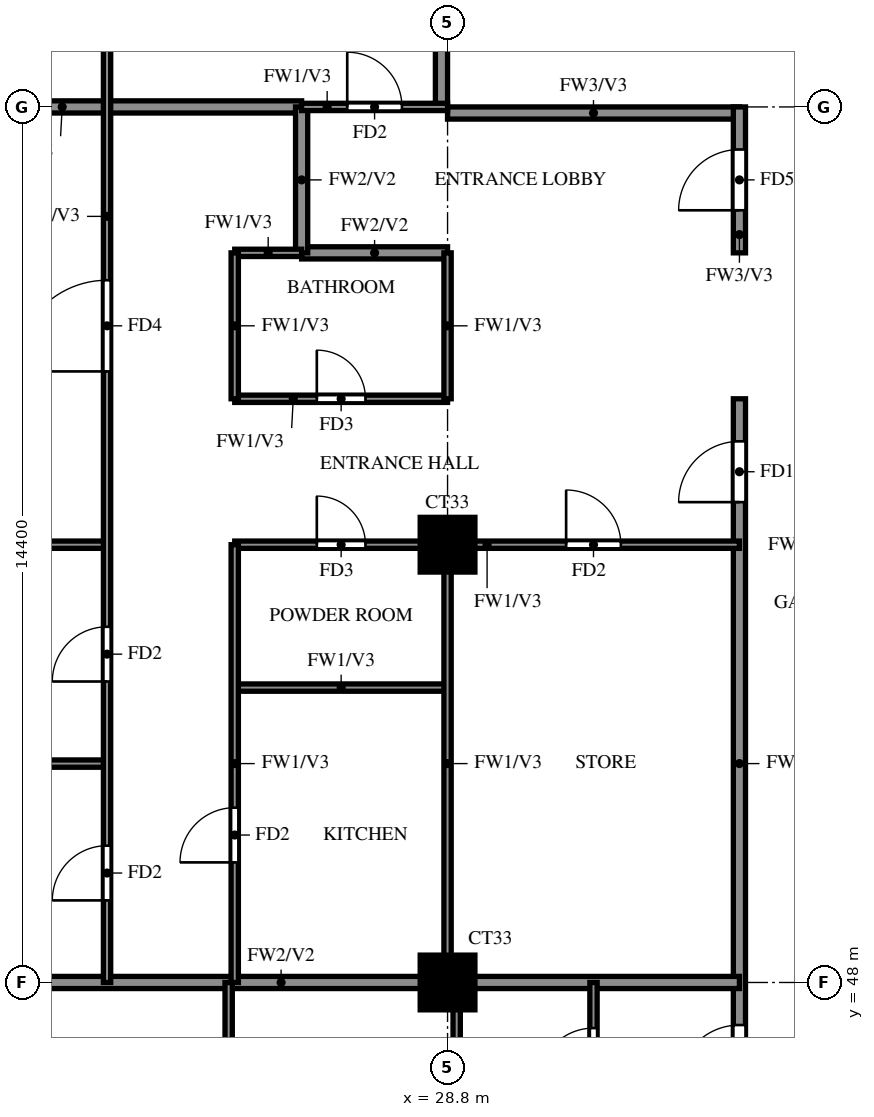
"""IFC4 building model, lengths in metres.
Left out: names, types, materials, properties, quantities, classifications, styles, units other than length and angle.
Written with IfcOpenShell. Run it as: python <this file> out.ifc"""

import sys

from ifc_helpers import new_model, si_unit, direction, frame, frame_2d, origin, origin_2d, place, context, subcontext, project, spatial, rectangle, extrude, source, transform, mapped, element, fill, save


model = new_model("IFC4")
c1 = context("Model", 3, precision=1e-05, world=origin(), true_north=direction((0.0, 1.0)))
c2 = subcontext(c1, "Body", "Model", "MODEL_VIEW")
j1 = project(units=[si_unit("LENGTHUNIT", "METRE"), si_unit("PLANEANGLEUNIT", "RADIAN")], contexts=[c1])
p1 = place(None, origin())
s1 = spatial("IfcSite", under=j1, at=p1, CompositionType="ELEMENT")
p2 = place(p1, origin())
s2 = spatial("IfcBuilding", under=s1, at=p2, CompositionType="ELEMENT")
p3 = place(p2, frame((0.0, 0.0, 222.0)))
s3 = spatial("IfcBuildingStorey", under=s2, at=p3, CompositionType="ELEMENT", Elevation=222.0)
m1 = source(origin(), c2, "Body", "SweptSolid", [
    extrude(rectangle(XDim=0.9, YDim=0.9, at=origin_2d()), origin(), (0.0, 0.0, 1.0), 3.22),
])
for number, where, z_axis, x_axis in (
    (1, (28.8, 48.0, 0.0), (0.0, 0.0, 1.0), (1.0, 0.0, 0.0)),
    (2, (28.8, 55.2, 0.0), (0.0, 0.0, 1.0), (1.0, 0.0, 0.0)),
):
    element("IfcColumn", number, at=place(p3, frame(where, z_axis=z_axis, x_axis=x_axis)), inside=s3, PredefinedType="COLUMN", context=c2, shape_type="MappedRepresentation", body=[
        mapped(m1, transform((0.0, 0.0, 0.0))),
    ])
p4 = place(p3, frame((28.8, 62.3, 0.0), z_axis=(0.0, 0.0, 1.0), x_axis=(1.0, 0.0, 0.0)))
e3 = element("IfcWall", 3, at=p4, inside=s3, PredefinedType="SOLIDWALL", context=c2, shape_type="SweptSolid", body=[
    extrude(rectangle(XDim=4.8, YDim=0.2, at=frame_2d((2.4, 0.0))), origin(), (0.0, 0.0, 1.0), 3.22),
])
p5 = place(p3, frame((28.7, 62.4, 0.0), z_axis=(0.0, 0.0, 1.0), x_axis=(0.0, 1.0, 0.0)))
e4 = element("IfcWall", 4, at=p5, inside=s3, PredefinedType="SOLIDWALL", context=c2, shape_type="SweptSolid", body=[
    extrude(rectangle(XDim=15.6, YDim=0.2, at=frame_2d((7.8, 0.0))), origin(), (0.0, 0.0, 1.0), 3.22),
])
p6 = place(p3, frame((33.6, 45.6, 0.0), z_axis=(0.0, 0.0, 1.0), x_axis=(0.0, 1.0, 0.0)))
e5 = element("IfcWall", 5, at=p6, inside=s3, PredefinedType="SOLIDWALL", context=c2, shape_type="SweptSolid", body=[
    extrude(rectangle(XDim=12.0, YDim=0.2, at=frame_2d((6.0, 0.0))), origin(), (0.0, 0.0, 1.0), 3.22),
])
p7 = place(p6, frame((0.7, 0.0, 0.0)))
e6 = element("IfcOpeningElement", 6, at=p7, cuts=e5, PredefinedType="OPENING", context=c2, shape_type="SweptSolid", body=[
    extrude(rectangle(XDim=1.0, YDim=2.1, at=frame_2d((0.5, 1.05))), frame((0.0, 0.11, 0.0), z_axis=(0.0, -1.0, 0.0), x_axis=(1.0, 0.0, 0.0)), (0.0, 0.0, 1.0), 0.22),
])
p8 = place(p6, frame((10.3, 0.0, 0.0)))
e7 = element("IfcOpeningElement", 7, at=p8, cuts=e5, PredefinedType="OPENING", context=c2, shape_type="SweptSolid", body=[
    extrude(rectangle(XDim=1.0, YDim=2.1, at=frame_2d((0.5, 1.05))), frame((0.0, 0.11, 0.0), z_axis=(0.0, -1.0, 0.0), x_axis=(1.0, 0.0, 0.0)), (0.0, 0.0, 1.0), 0.22),
])
p9 = place(p3, frame((33.6, 60.0, 0.0), z_axis=(0.0, 0.0, 1.0), x_axis=(0.0, 1.0, 0.0)))
e8 = element("IfcWall", 8, at=p9, inside=s3, PredefinedType="SOLIDWALL", context=c2, shape_type="SweptSolid", body=[
    extrude(rectangle(XDim=2.4, YDim=0.2, at=frame_2d((1.2, 0.0))), origin(), (0.0, 0.0, 1.0), 3.22),
])
p10 = place(p9, frame((0.7, 0.0, 0.0)))
e9 = element("IfcOpeningElement", 9, at=p10, cuts=e8, PredefinedType="OPENING", context=c2, shape_type="SweptSolid", body=[
    extrude(rectangle(XDim=1.0, YDim=2.1, at=frame_2d((0.5, 1.05))), frame((0.0, 0.11, 0.0), z_axis=(0.0, -1.0, 0.0), x_axis=(1.0, 0.0, 0.0)), (0.0, 0.0, 1.0), 0.22),
])
p11 = place(p3, frame((18.525, 48.0, 0.0), z_axis=(0.0, 0.0, 1.0), x_axis=(1.0, 0.0, 0.0)))
e10 = element("IfcWall", 10, at=p11, inside=s3, PredefinedType="SOLIDWALL", context=c2, shape_type="SweptSolid", body=[
    extrude(rectangle(XDim=15.075, YDim=0.2, at=frame_2d((7.538, 0.0))), origin(), (0.0, 0.0, 1.0), 3.22),
])
p12 = place(p3, frame((26.4, 60.0, 0.0), z_axis=(0.0, 0.0, 1.0), x_axis=(1.0, 0.0, 0.0)))
e11 = element("IfcWall", 11, at=p12, inside=s3, PredefinedType="SOLIDWALL", context=c2, shape_type="SweptSolid", body=[
    extrude(rectangle(XDim=2.4, YDim=0.2, at=frame_2d((1.2, 0.0))), origin(), (0.0, 0.0, 1.0), 3.22),
])
p13 = place(p3, frame((18.525, 62.4, 0.0), z_axis=(0.0, 0.0, 1.0), x_axis=(1.0, 0.0, 0.0)))
e12 = element("IfcWall", 12, at=p13, inside=s3, PredefinedType="SOLIDWALL", context=c2, shape_type="SweptSolid", body=[
    extrude(rectangle(XDim=7.875, YDim=0.2, at=frame_2d((3.938, 0.0))), origin(), (0.0, 0.0, 1.0), 3.22),
])
p14 = place(p3, frame((26.4, 60.0, 0.0), z_axis=(0.0, 0.0, 1.0), x_axis=(0.0, 1.0, 0.0)))
e13 = element("IfcWall", 13, at=p14, inside=s3, PredefinedType="SOLIDWALL", context=c2, shape_type="SweptSolid", body=[
    extrude(rectangle(XDim=2.4, YDim=0.2, at=frame_2d((1.2, 0.0))), origin(), (0.0, 0.0, 1.0), 3.22),
])
p15 = place(p3, frame((18.525, 51.6, 0.0), z_axis=(0.0, 0.0, 1.0), x_axis=(1.0, 0.0, 0.0)))
e14 = element("IfcWall", 14, at=p15, inside=s3, PredefinedType="PARTITIONING", context=c2, shape_type="SweptSolid", body=[
    extrude(rectangle(XDim=4.675, YDim=0.12, at=frame_2d((2.337, 0.0))), origin(), (0.0, 0.0, 1.0), 2.32),
])
p16 = place(p3, frame((25.3, 52.85, 0.0), z_axis=(0.0, 0.0, 1.0), x_axis=(1.0, 0.0, 0.0)))
e15 = element("IfcWall", 15, at=p16, inside=s3, PredefinedType="PARTITIONING", context=c2, shape_type="SweptSolid", body=[
    extrude(rectangle(XDim=3.5, YDim=0.12, at=frame_2d((1.75, 0.0))), origin(), (0.0, 0.0, 1.0), 3.22),
])
p17 = place(p3, frame((18.525, 55.2, 0.0), z_axis=(0.0, 0.0, 1.0), x_axis=(1.0, 0.0, 0.0)))
e16 = element("IfcWall", 16, at=p17, inside=s3, PredefinedType="PARTITIONING", context=c2, shape_type="SweptSolid", body=[
    extrude(rectangle(XDim=4.675, YDim=0.12, at=frame_2d((2.337, 0.0))), origin(), (0.0, 0.0, 1.0), 3.22),
])
p18 = place(p3, frame((25.3, 55.2, 0.0), z_axis=(0.0, 0.0, 1.0), x_axis=(1.0, 0.0, 0.0)))
e17 = element("IfcWall", 17, at=p18, inside=s3, PredefinedType="PARTITIONING", context=c2, shape_type="SweptSolid", body=[
    extrude(rectangle(XDim=8.3, YDim=0.12, at=frame_2d((4.15, 0.0))), origin(), (0.0, 0.0, 1.0), 3.22),
])
p19 = place(p18, frame((1.35, 0.0, 0.0)))
e18 = element("IfcOpeningElement", 18, at=p19, cuts=e17, PredefinedType="OPENING", context=c2, shape_type="SweptSolid", body=[
    extrude(rectangle(XDim=0.8, YDim=2.1, at=frame_2d((0.4, 1.05))), frame((0.0, 0.07, 0.0), z_axis=(0.0, -1.0, 0.0), x_axis=(1.0, 0.0, 0.0)), (0.0, 0.0, 1.0), 0.14),
])
p20 = place(p18, frame((5.45, 0.0, 0.0)))
e19 = element("IfcOpeningElement", 19, at=p20, cuts=e17, PredefinedType="OPENING", context=c2, shape_type="SweptSolid", body=[
    extrude(rectangle(XDim=0.9, YDim=2.1, at=frame_2d((0.45, 1.05))), frame((0.0, 0.07, 0.0), z_axis=(0.0, -1.0, 0.0), x_axis=(1.0, 0.0, 0.0)), (0.0, 0.0, 1.0), 0.14),
])
p21 = place(p3, frame((25.3, 57.6, 0.0), z_axis=(0.0, 0.0, 1.0), x_axis=(1.0, 0.0, 0.0)))
e20 = element("IfcWall", 20, at=p21, inside=s3, PredefinedType="PARTITIONING", context=c2, shape_type="SweptSolid", body=[
    extrude(rectangle(XDim=3.5, YDim=0.12, at=frame_2d((1.75, 0.0))), origin(), (0.0, 0.0, 1.0), 3.22),
])
p22 = place(p21, frame((1.35, 0.0, 0.0)))
e21 = element("IfcOpeningElement", 21, at=p22, cuts=e20, PredefinedType="OPENING", context=c2, shape_type="SweptSolid", body=[
    extrude(rectangle(XDim=0.8, YDim=2.1, at=frame_2d((0.4, 1.05))), frame((0.0, 0.07, 0.0), z_axis=(0.0, -1.0, 0.0), x_axis=(1.0, 0.0, 0.0)), (0.0, 0.0, 1.0), 0.14),
])
p23 = place(p3, frame((25.3, 60.0, 0.0), z_axis=(0.0, 0.0, 1.0), x_axis=(1.0, 0.0, 0.0)))
e22 = element("IfcWall", 22, at=p23, inside=s3, PredefinedType="PARTITIONING", context=c2, shape_type="SweptSolid", body=[
    extrude(rectangle(XDim=1.1, YDim=0.12, at=frame_2d((0.55, 0.0))), origin(), (0.0, 0.0, 1.0), 3.22),
])
p24 = place(p3, frame((26.4, 62.4, 0.0), z_axis=(0.0, 0.0, 1.0), x_axis=(1.0, 0.0, 0.0)))
e23 = element("IfcWall", 23, at=p24, inside=s3, PredefinedType="PARTITIONING", context=c2, shape_type="SweptSolid", body=[
    extrude(rectangle(XDim=2.4, YDim=0.12, at=frame_2d((1.2, 0.0))), origin(), (0.0, 0.0, 1.0), 3.22),
])
p25 = place(p24, frame((0.75, 0.0, 0.0)))
e24 = element("IfcOpeningElement", 24, at=p25, cuts=e23, PredefinedType="OPENING", context=c2, shape_type="SweptSolid", body=[
    extrude(rectangle(XDim=0.9, YDim=2.1, at=frame_2d((0.45, 1.05))), frame((0.0, 0.07, 0.0), z_axis=(0.0, -1.0, 0.0), x_axis=(1.0, 0.0, 0.0)), (0.0, 0.0, 1.0), 0.14),
])
p26 = place(p3, frame((23.2, 48.0, 0.0), z_axis=(0.0, 0.0, 1.0), x_axis=(0.0, 1.0, 0.0)))
e25 = element("IfcWall", 25, at=p26, inside=s3, PredefinedType="PARTITIONING", context=c2, shape_type="SweptSolid", body=[
    extrude(rectangle(XDim=25.2, YDim=0.12, at=frame_2d((12.6, 0.0))), origin(), (0.0, 0.0, 1.0), 3.22),
])
p27 = place(p26, frame((1.35, 0.0, 0.0)))
e26 = element("IfcOpeningElement", 26, at=p27, cuts=e25, PredefinedType="OPENING", context=c2, shape_type="SweptSolid", body=[
    extrude(rectangle(XDim=0.9, YDim=2.1, at=frame_2d((0.45, 1.05))), frame((0.0, 0.07, 0.0), z_axis=(0.0, -1.0, 0.0), x_axis=(1.0, 0.0, 0.0)), (0.0, 0.0, 1.0), 0.14),
])
p28 = place(p26, frame((4.95, 0.0, 0.0)))
e27 = element("IfcOpeningElement", 27, at=p28, cuts=e25, PredefinedType="OPENING", context=c2, shape_type="SweptSolid", body=[
    extrude(rectangle(XDim=0.9, YDim=2.1, at=frame_2d((0.45, 1.05))), frame((0.0, 0.07, 0.0), z_axis=(0.0, -1.0, 0.0), x_axis=(1.0, 0.0, 0.0)), (0.0, 0.0, 1.0), 0.14),
])
p29 = place(p26, frame((10.05, 0.0, 0.0)))
e28 = element("IfcOpeningElement", 28, at=p29, cuts=e25, PredefinedType="OPENING", context=c2, shape_type="SweptSolid", body=[
    extrude(rectangle(XDim=1.5, YDim=2.1, at=frame_2d((0.75, 1.05))), frame((0.0, 0.07, 0.0), z_axis=(0.0, -1.0, 0.0), x_axis=(1.0, 0.0, 0.0)), (0.0, 0.0, 1.0), 0.14),
])
p30 = place(p26, frame((15.75, 0.0, 0.0)))
e29 = element("IfcOpeningElement", 29, at=p30, cuts=e25, PredefinedType="OPENING", context=c2, shape_type="SweptSolid", body=[
    extrude(rectangle(XDim=0.9, YDim=2.1, at=frame_2d((0.45, 1.05))), frame((0.0, 0.07, 0.0), z_axis=(0.0, -1.0, 0.0), x_axis=(1.0, 0.0, 0.0)), (0.0, 0.0, 1.0), 0.14),
])
p31 = place(p26, frame((19.35, 0.0, 0.0)))
e30 = element("IfcOpeningElement", 30, at=p31, cuts=e25, PredefinedType="OPENING", context=c2, shape_type="SweptSolid", body=[
    extrude(rectangle(XDim=0.9, YDim=2.1, at=frame_2d((0.45, 1.05))), frame((0.0, 0.07, 0.0), z_axis=(0.0, -1.0, 0.0), x_axis=(1.0, 0.0, 0.0)), (0.0, 0.0, 1.0), 0.14),
])
p32 = place(p26, frame((22.95, 0.0, 0.0)))
e31 = element("IfcOpeningElement", 31, at=p32, cuts=e25, PredefinedType="OPENING", context=c2, shape_type="SweptSolid", body=[
    extrude(rectangle(XDim=0.9, YDim=2.1, at=frame_2d((0.45, 1.05))), frame((0.0, 0.07, 0.0), z_axis=(0.0, -1.0, 0.0), x_axis=(1.0, 0.0, 0.0)), (0.0, 0.0, 1.0), 0.14),
])
p33 = place(p3, frame((25.2, 39.725, 0.0), z_axis=(0.0, 0.0, 1.0), x_axis=(0.0, 1.0, 0.0)))
e32 = element("IfcWall", 32, at=p33, inside=s3, PredefinedType="PARTITIONING", context=c2, shape_type="SweptSolid", body=[
    extrude(rectangle(XDim=8.275, YDim=0.12, at=frame_2d((4.137, 0.0))), origin(), (0.0, 0.0, 1.0), 3.22),
])
p34 = place(p33, frame((4.525, 0.0, 0.0)))
e33 = element("IfcOpeningElement", 33, at=p34, cuts=e32, PredefinedType="OPENING", context=c2, shape_type="SweptSolid", body=[
    extrude(rectangle(XDim=0.9, YDim=2.1, at=frame_2d((0.45, 1.05))), frame((0.0, 0.07, 0.0), z_axis=(0.0, -1.0, 0.0), x_axis=(1.0, 0.0, 0.0)), (0.0, 0.0, 1.0), 0.14),
])
p35 = place(p3, frame((25.3, 48.0, 0.0), z_axis=(0.0, 0.0, 1.0), x_axis=(0.0, 1.0, 0.0)))
e34 = element("IfcWall", 34, at=p35, inside=s3, PredefinedType="PARTITIONING", context=c2, shape_type="SweptSolid", body=[
    extrude(rectangle(XDim=7.2, YDim=0.12, at=frame_2d((3.6, 0.0))), origin(), (0.0, 0.0, 1.0), 3.22),
])
p36 = place(p35, frame((1.975, 0.0, 0.0)))
e35 = element("IfcOpeningElement", 35, at=p36, cuts=e34, PredefinedType="OPENING", context=c2, shape_type="SweptSolid", body=[
    extrude(rectangle(XDim=0.9, YDim=2.1, at=frame_2d((0.45, 1.05))), frame((0.0, 0.07, 0.0), z_axis=(0.0, -1.0, 0.0), x_axis=(1.0, 0.0, 0.0)), (0.0, 0.0, 1.0), 0.14),
])
p37 = place(p3, frame((25.3, 57.6, 0.0), z_axis=(0.0, 0.0, 1.0), x_axis=(0.0, 1.0, 0.0)))
e36 = element("IfcWall", 36, at=p37, inside=s3, PredefinedType="PARTITIONING", context=c2, shape_type="SweptSolid", body=[
    extrude(rectangle(XDim=2.4, YDim=0.12, at=frame_2d((1.2, 0.0))), origin(), (0.0, 0.0, 1.0), 3.22),
])
p38 = place(p3, frame((28.8, 48.0, 0.0), z_axis=(0.0, 0.0, 1.0), x_axis=(0.0, 1.0, 0.0)))
e37 = element("IfcWall", 37, at=p38, inside=s3, PredefinedType="PARTITIONING", context=c2, shape_type="SweptSolid", body=[
    extrude(rectangle(XDim=7.2, YDim=0.12, at=frame_2d((3.6, 0.0))), origin(), (0.0, 0.0, 1.0), 3.22),
])
for number, where, z_axis, x_axis in (
    (38, (28.8, 57.6, 0.0), (0.0, 0.0, 1.0), (0.0, 1.0, 0.0)),
    (39, (28.95, 45.6, 0.0), (0.0, 0.0, 1.0), (0.0, 1.0, 0.0)),
):
    element("IfcWall", number, at=place(p3, frame(where, z_axis=z_axis, x_axis=x_axis)), inside=s3, PredefinedType="PARTITIONING", context=c2, shape_type="SweptSolid", body=[
        extrude(rectangle(XDim=2.4, YDim=0.12, at=frame_2d((1.2, 0.0))), origin(), (0.0, 0.0, 1.0), 3.22),
    ])
p39 = place(p3, frame((31.2, 45.6, 0.0), z_axis=(0.0, 0.0, 1.0), x_axis=(0.0, 1.0, 0.0)))
e40 = element("IfcWall", 40, at=p39, inside=s3, PredefinedType="PARTITIONING", context=c2, shape_type="SweptSolid", body=[
    extrude(rectangle(XDim=2.4, YDim=0.12, at=frame_2d((1.2, 0.0))), origin(), (0.0, 0.0, 1.0), 3.22),
])
p40 = place(p39, frame((0.75, 0.0, 0.0)))
e41 = element("IfcOpeningElement", 41, at=p40, cuts=e40, PredefinedType="OPENING", context=c2, shape_type="SweptSolid", body=[
    extrude(rectangle(XDim=0.9, YDim=2.1, at=frame_2d((0.45, 1.05))), frame((0.0, 0.07, 0.0), z_axis=(0.0, -1.0, 0.0), x_axis=(1.0, 0.0, 0.0)), (0.0, 0.0, 1.0), 0.14),
])
p41 = place(p7, origin())
e42 = element("IfcDoor", 42, at=p41, inside=s3, OperationType="SINGLE_SWING_LEFT", PredefinedType="DOOR", context=c2, shape_type="SweptSolid", body=[
    extrude(rectangle(XDim=1.0, YDim=2.1, at=frame_2d((0.5, 1.05))), frame((0.0, 0.025, 0.0), z_axis=(0.0, -1.0, 0.0), x_axis=(1.0, 0.0, 0.0)), (0.0, 0.0, 1.0), 0.05),
])
fill(e6, e42)
p42 = place(p40, origin())
e43 = element("IfcDoor", 43, at=p42, inside=s3, OperationType="SINGLE_SWING_LEFT", PredefinedType="DOOR", context=c2, shape_type="SweptSolid", body=[
    extrude(rectangle(XDim=0.9, YDim=2.1, at=frame_2d((0.45, 1.05))), frame((0.0, 0.025, 0.0), z_axis=(0.0, -1.0, 0.0), x_axis=(1.0, 0.0, 0.0)), (0.0, 0.0, 1.0), 0.05),
])
fill(e41, e43)
p43 = place(p8, origin())
e44 = element("IfcDoor", 44, at=p43, inside=s3, OperationType="SINGLE_SWING_RIGHT", PredefinedType="DOOR", context=c2, shape_type="SweptSolid", body=[
    extrude(rectangle(XDim=1.0, YDim=2.1, at=frame_2d((0.5, 1.05))), frame((0.0, 0.025, 0.0), z_axis=(0.0, -1.0, 0.0), x_axis=(1.0, 0.0, 0.0)), (0.0, 0.0, 1.0), 0.05),
])
fill(e7, e44)
p44 = place(p27, origin())
e45 = element("IfcDoor", 45, at=p44, inside=s3, OperationType="SINGLE_SWING_LEFT", PredefinedType="DOOR", context=c2, shape_type="SweptSolid", body=[
    extrude(rectangle(XDim=0.9, YDim=2.1, at=frame_2d((0.45, 1.05))), frame((0.0, 0.025, 0.0), z_axis=(0.0, -1.0, 0.0), x_axis=(1.0, 0.0, 0.0)), (0.0, 0.0, 1.0), 0.05),
])
fill(e26, e45)
p45 = place(p28, origin())
e46 = element("IfcDoor", 46, at=p45, inside=s3, OperationType="SINGLE_SWING_LEFT", PredefinedType="DOOR", context=c2, shape_type="SweptSolid", body=[
    extrude(rectangle(XDim=0.9, YDim=2.1, at=frame_2d((0.45, 1.05))), frame((0.0, 0.025, 0.0), z_axis=(0.0, -1.0, 0.0), x_axis=(1.0, 0.0, 0.0)), (0.0, 0.0, 1.0), 0.05),
])
fill(e27, e46)
p46 = place(p29, origin())
e47 = element("IfcDoor", 47, at=p46, inside=s3, OperationType="SINGLE_SWING_RIGHT", PredefinedType="DOOR", context=c2, shape_type="SweptSolid", body=[
    extrude(rectangle(XDim=1.5, YDim=2.1, at=frame_2d((0.75, 1.05))), frame((0.0, 0.025, 0.0), z_axis=(0.0, -1.0, 0.0), x_axis=(1.0, 0.0, 0.0)), (0.0, 0.0, 1.0), 0.05),
])
fill(e28, e47)
p47 = place(p36, origin())
e48 = element("IfcDoor", 48, at=p47, inside=s3, OperationType="SINGLE_SWING_LEFT", PredefinedType="DOOR", context=c2, shape_type="SweptSolid", body=[
    extrude(rectangle(XDim=0.9, YDim=2.1, at=frame_2d((0.45, 1.05))), frame((0.0, 0.025, 0.0), z_axis=(0.0, -1.0, 0.0), x_axis=(1.0, 0.0, 0.0)), (0.0, 0.0, 1.0), 0.05),
])
fill(e35, e48)
p48 = place(p19, origin())
e49 = element("IfcDoor", 49, at=p48, inside=s3, OperationType="SINGLE_SWING_LEFT", PredefinedType="DOOR", context=c2, shape_type="SweptSolid", body=[
    extrude(rectangle(XDim=0.8, YDim=2.1, at=frame_2d((0.4, 1.05))), frame((0.0, 0.025, 0.0), z_axis=(0.0, -1.0, 0.0), x_axis=(1.0, 0.0, 0.0)), (0.0, 0.0, 1.0), 0.05),
])
fill(e18, e49)
p49 = place(p22, origin())
e50 = element("IfcDoor", 50, at=p49, inside=s3, OperationType="SINGLE_SWING_RIGHT", PredefinedType="DOOR", context=c2, shape_type="SweptSolid", body=[
    extrude(rectangle(XDim=0.8, YDim=2.1, at=frame_2d((0.4, 1.05))), frame((0.0, 0.025, 0.0), z_axis=(0.0, -1.0, 0.0), x_axis=(1.0, 0.0, 0.0)), (0.0, 0.0, 1.0), 0.05),
])
fill(e21, e50)
p50 = place(p20, origin())
e51 = element("IfcDoor", 51, at=p50, inside=s3, OperationType="SINGLE_SWING_LEFT", PredefinedType="DOOR", context=c2, shape_type="SweptSolid", body=[
    extrude(rectangle(XDim=0.9, YDim=2.1, at=frame_2d((0.45, 1.05))), frame((0.0, 0.025, 0.0), z_axis=(0.0, -1.0, 0.0), x_axis=(1.0, 0.0, 0.0)), (0.0, 0.0, 1.0), 0.05),
])
fill(e19, e51)
p51 = place(p25, origin())
e52 = element("IfcDoor", 52, at=p51, inside=s3, OperationType="SINGLE_SWING_LEFT", PredefinedType="DOOR", context=c2, shape_type="SweptSolid", body=[
    extrude(rectangle(XDim=0.9, YDim=2.1, at=frame_2d((0.45, 1.05))), frame((0.0, 0.025, 0.0), z_axis=(0.0, -1.0, 0.0), x_axis=(1.0, 0.0, 0.0)), (0.0, 0.0, 1.0), 0.05),
])
fill(e24, e52)
p52 = place(p10, origin())
e53 = element("IfcDoor", 53, at=p52, inside=s3, OperationType="SINGLE_SWING_LEFT", PredefinedType="DOOR", context=c2, shape_type="SweptSolid", body=[
    extrude(rectangle(XDim=1.0, YDim=2.1, at=frame_2d((0.5, 1.05))), frame((0.0, 0.025, 0.0), z_axis=(0.0, -1.0, 0.0), x_axis=(1.0, 0.0, 0.0)), (0.0, 0.0, 1.0), 0.05),
])
fill(e9, e53)
save(model, sys.argv[1])
